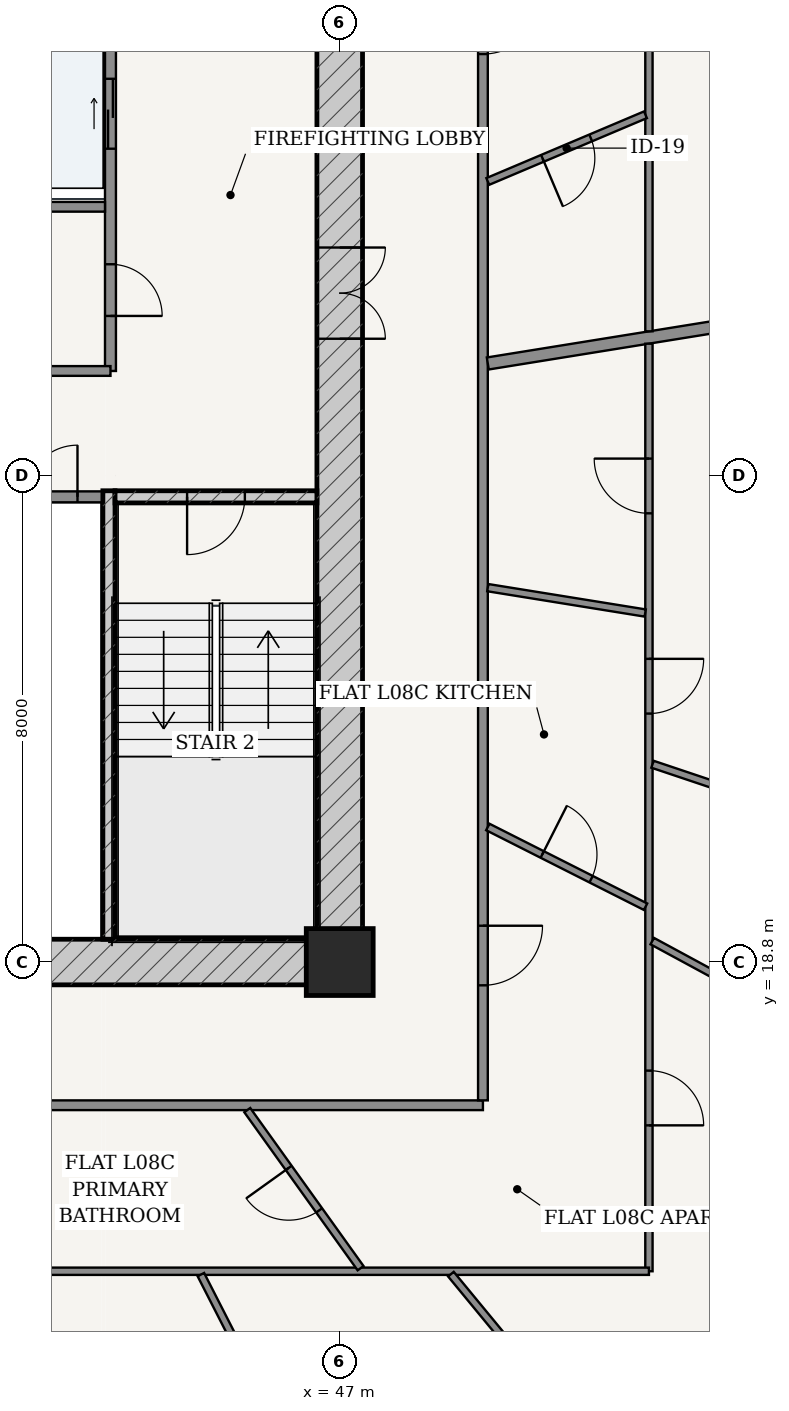
"""IFC4 building model, lengths in metres.
Left out: names, types, materials, properties, quantities, classifications, styles, units other than length and angle.
Written with IfcOpenShell. Run it as: python <this file> out.ifc"""

import sys

from ifc_helpers import new_model, si_unit, direction, frame, frame_2d, origin, origin_2d, place, context, subcontext, project, spatial, rectangle, extrude, source, transform, mapped, element, fill, save


model = new_model("IFC4")
c1 = context("Model", 3, precision=1e-05, world=origin(), true_north=direction((-0.2419218956, 0.970295726276)))
c2 = subcontext(c1, "Body", "Model", "MODEL_VIEW")
j1 = project(units=[si_unit("LENGTHUNIT", "METRE"), si_unit("PLANEANGLEUNIT", "RADIAN")], contexts=[c1])
p1 = place(None, origin())
s1 = spatial("IfcSite", under=j1, at=p1, CompositionType="ELEMENT")
p2 = place(p1, origin())
s2 = spatial("IfcBuilding", under=s1, at=p2, CompositionType="ELEMENT")
p3 = place(p2, frame((0.0, 0.0, 34.8)))
s3 = spatial("IfcBuildingStorey", under=s2, at=p3, CompositionType="ELEMENT", Elevation=34.8)
p4 = place(p3, frame((47.0, 18.8, 0.0), z_axis=(0.0, 0.0, 1.0), x_axis=(1.0, 0.0, 0.0)))
e1 = element("IfcColumn", 1, at=p4, inside=s3, PredefinedType="COLUMN", context=c2, shape_type="SweptSolid", body=[
    extrude(rectangle(XDim=1.1, YDim=1.1, at=origin_2d()), origin(), (0.0, 0.0, 1.0), 3.6),
])
p5 = place(p3, frame((28.625, 18.8, 0.0), z_axis=(0.0, 0.0, 1.0), x_axis=(1.0, 0.0, 0.0)))
e2 = element("IfcWall", 2, at=p5, inside=s3, PredefinedType="SHEAR", context=c2, shape_type="SweptSolid", body=[
    extrude(rectangle(XDim=18.75, YDim=0.75, at=frame_2d((9.375, 0.0))), origin(), (0.0, 0.0, 1.0), 3.32),
])
p6 = place(p5, frame((6.927, 0.0, 0.0)))
e3 = element("IfcOpeningElement", 3, at=p6, cuts=e2, PredefinedType="OPENING", context=c2, shape_type="SweptSolid", body=[
    extrude(rectangle(XDim=0.85, YDim=2.1, at=frame_2d((0.425, 1.05))), frame((0.0, 0.385, 0.0), z_axis=(0.0, -1.0, 0.0), x_axis=(1.0, 0.0, 0.0)), (0.0, 0.0, 1.0), 0.77),
])
p7 = place(p5, frame((8.95, 0.0, 0.0)))
e4 = element("IfcOpeningElement", 4, at=p7, cuts=e2, PredefinedType="OPENING", context=c2, shape_type="SweptSolid", body=[
    extrude(rectangle(XDim=0.85, YDim=2.1, at=frame_2d((0.425, 1.05))), frame((0.0, 0.385, 0.0), z_axis=(0.0, -1.0, 0.0), x_axis=(1.0, 0.0, 0.0)), (0.0, 0.0, 1.0), 0.77),
])
p8 = place(p5, frame((10.972, 0.0, 0.0)))
e5 = element("IfcOpeningElement", 5, at=p8, cuts=e2, PredefinedType="OPENING", context=c2, shape_type="SweptSolid", body=[
    extrude(rectangle(XDim=0.85, YDim=2.1, at=frame_2d((0.425, 1.05))), frame((0.0, 0.385, 0.0), z_axis=(0.0, -1.0, 0.0), x_axis=(1.0, 0.0, 0.0)), (0.0, 0.0, 1.0), 0.77),
])
p9 = place(p3, frame((47.0, 19.175, 0.0), z_axis=(0.0, 0.0, 1.0), x_axis=(0.0, 1.0, 0.0)))
e6 = element("IfcWall", 6, at=p9, inside=s3, PredefinedType="SHEAR", context=c2, shape_type="SweptSolid", body=[
    extrude(rectangle(XDim=15.25, YDim=0.75, at=frame_2d((7.625, 0.0))), origin(), (0.0, 0.0, 1.0), 3.32),
])
p10 = place(p9, frame((9.875, 0.0, 0.0)))
e7 = element("IfcOpeningElement", 7, at=p10, cuts=e6, PredefinedType="OPENING", context=c2, shape_type="SweptSolid", body=[
    extrude(rectangle(XDim=1.5, YDim=2.2, at=frame_2d((0.75, 1.1))), frame((0.0, 0.385, 0.0), z_axis=(0.0, -1.0, 0.0), x_axis=(1.0, 0.0, 0.0)), (0.0, 0.0, 1.0), 0.77),
])
p11 = place(p3, frame((43.205, 19.175, 0.0), z_axis=(0.0, 0.0, 1.0), x_axis=(0.0, 1.0, 0.0)))
e8 = element("IfcWall", 8, at=p11, inside=s3, PredefinedType="SOLIDWALL", context=c2, shape_type="SweptSolid", body=[
    extrude(rectangle(XDim=7.375, YDim=0.2, at=frame_2d((3.688, 0.0))), origin(), (0.0, 0.0, 1.0), 3.32),
])
p12 = place(p3, frame((43.305, 26.45, 0.0), z_axis=(0.0, 0.0, 1.0), x_axis=(1.0, 0.0, 0.0)))
e9 = element("IfcWall", 9, at=p12, inside=s3, PredefinedType="SOLIDWALL", context=c2, shape_type="SweptSolid", body=[
    extrude(rectangle(XDim=3.32, YDim=0.2, at=frame_2d((1.66, 0.0))), origin(), (0.0, 0.0, 1.0), 3.32),
])
p13 = place(p12, frame((1.185, 0.0, 0.0)))
e10 = element("IfcOpeningElement", 10, at=p13, cuts=e9, PredefinedType="OPENING", context=c2, shape_type="SweptSolid", body=[
    extrude(rectangle(XDim=0.95, YDim=2.15, at=frame_2d((0.475, 1.075))), frame((0.0, 0.11, 0.0), z_axis=(0.0, -1.0, 0.0), x_axis=(1.0, 0.0, 0.0)), (0.0, 0.0, 1.0), 0.22),
])
p14 = place(p3, frame((41.425, 26.45, 0.0), z_axis=(0.0, 0.0, 1.0), x_axis=(1.0, 0.0, 0.0)))
e11 = element("IfcWall", 11, at=p14, inside=s3, PredefinedType="PARTITIONING", context=c2, shape_type="SweptSolid", body=[
    extrude(rectangle(XDim=1.675, YDim=0.18, at=frame_2d((0.837, 0.0))), origin(), (0.0, 0.0, 1.0), 3.32),
])
p15 = place(p14, frame((0.413, 0.0, 0.0)))
e12 = element("IfcOpeningElement", 12, at=p15, cuts=e11, PredefinedType="OPENING", context=c2, shape_type="SweptSolid", body=[
    extrude(rectangle(XDim=0.85, YDim=2.1, at=frame_2d((0.425, 1.05))), frame((0.0, 0.1, 0.0), z_axis=(0.0, -1.0, 0.0), x_axis=(1.0, 0.0, 0.0)), (0.0, 0.0, 1.0), 0.2),
])
p16 = place(p3, frame((43.23, 28.52, 0.0), z_axis=(0.0, 0.0, 1.0), x_axis=(0.0, 1.0, 0.0)))
e13 = element("IfcWall", 13, at=p16, inside=s3, PredefinedType="PARTITIONING", context=c2, shape_type="SweptSolid", body=[
    extrude(rectangle(XDim=5.905, YDim=0.18, at=frame_2d((2.953, 0.0))), origin(), (0.0, 0.0, 1.0), 3.32),
])
p17 = place(p16, frame((0.905, 0.0, 0.0)))
e14 = element("IfcOpeningElement", 14, at=p17, cuts=e13, PredefinedType="OPENING", context=c2, shape_type="SweptSolid", body=[
    extrude(rectangle(XDim=0.85, YDim=2.1, at=frame_2d((0.425, 1.05))), frame((0.0, 0.1, 0.0), z_axis=(0.0, -1.0, 0.0), x_axis=(1.0, 0.0, 0.0)), (0.0, 0.0, 1.0), 0.2),
])
p18 = place(p16, frame((3.655, 0.0, 0.0)))
e15 = element("IfcOpeningElement", 15, at=p18, cuts=e13, PredefinedType="OPENING", context=c2, shape_type="SweptSolid", body=[
    extrude(rectangle(XDim=1.15, YDim=2.2, at=frame_2d((0.575, 1.1))), frame((0.0, 0.1, 0.0), z_axis=(0.0, -1.0, 0.0), x_axis=(1.0, 0.0, 0.0)), (0.0, 0.0, 1.0), 0.2),
])
p19 = place(p3, frame((41.425, 31.22, 0.0), z_axis=(0.0, 0.0, 1.0), x_axis=(1.0, 0.0, 0.0)))
e16 = element("IfcWall", 16, at=p19, inside=s3, PredefinedType="PARTITIONING", context=c2, shape_type="SweptSolid", body=[
    extrude(rectangle(XDim=1.715, YDim=0.16, at=frame_2d((0.857, 0.0))), origin(), (0.0, 0.0, 1.0), 3.32),
])
p20 = place(p3, frame((41.425, 28.52, 0.0), z_axis=(0.0, 0.0, 1.0), x_axis=(1.0, 0.0, 0.0)))
e17 = element("IfcWall", 17, at=p20, inside=s3, PredefinedType="PARTITIONING", context=c2, shape_type="SweptSolid", body=[
    extrude(rectangle(XDim=1.805, YDim=0.16, at=frame_2d((0.902, 0.0))), origin(), (0.0, 0.0, 1.0), 3.32),
])
p21 = place(p3, frame((26.645, 16.445, 0.0), z_axis=(0.0, 0.0, 1.0), x_axis=(1.0, 0.0, 0.0)))
e18 = element("IfcWall", 18, at=p21, inside=s3, PredefinedType="PARTITIONING", context=c2, shape_type="SweptSolid", body=[
    extrude(rectangle(XDim=22.71, YDim=0.16, at=frame_2d((11.355, 0.0))), origin(), (0.0, 0.0, 1.0), 2.688),
])
p22 = place(p3, frame((49.355, 16.525, 0.0), z_axis=(0.0, 0.0, 1.0), x_axis=(0.0, 1.0, 0.0)))
e19 = element("IfcWall", 19, at=p22, inside=s3, PredefinedType="PARTITIONING", context=c2, shape_type="SweptSolid", body=[
    extrude(rectangle(XDim=20.55, YDim=0.16, at=frame_2d((10.275, 0.0))), origin(), (0.0, 0.0, 1.0), 2.688),
])
p23 = place(p22, frame((17.207, 0.0, 0.0)))
e20 = element("IfcOpeningElement", 20, at=p23, cuts=e19, PredefinedType="OPENING", context=c2, shape_type="SweptSolid", body=[
    extrude(rectangle(XDim=0.98, YDim=2.2, at=frame_2d((0.49, 1.1))), frame((0.0, 0.09, 0.0), z_axis=(0.0, -1.0, 0.0), x_axis=(1.0, 0.0, 0.0)), (0.0, 0.0, 1.0), 0.18),
])
p24 = place(p22, frame((1.892, 0.0, 0.0)))
e21 = element("IfcOpeningElement", 21, at=p24, cuts=e19, PredefinedType="OPENING", context=c2, shape_type="SweptSolid", body=[
    extrude(rectangle(XDim=0.98, YDim=2.2, at=frame_2d((0.49, 1.1))), frame((0.0, 0.09, 0.0), z_axis=(0.0, -1.0, 0.0), x_axis=(1.0, 0.0, 0.0)), (0.0, 0.0, 1.0), 0.18),
])
p25 = place(p3, frame((49.435, 28.643, 0.0), z_axis=(0.0, 0.0, 1.0), x_axis=(0.987255953651, 0.159140447344, 0.0)))
e22 = element("IfcWall", 22, at=p25, inside=s3, PredefinedType="PARTITIONING", context=c2, shape_type="SweptSolid", body=[
    extrude(rectangle(XDim=17.105, YDim=0.2, at=frame_2d((8.553, 0.0))), origin(), (0.0, 0.0, 1.0), 2.688),
])
p26 = place(p3, frame((52.085, 39.885, 0.0), z_axis=(0.0, 0.0, 1.0), x_axis=(0.0, -1.0, 0.0)))
e23 = element("IfcWall", 23, at=p26, inside=s3, PredefinedType="PARTITIONING", context=c2, shape_type="SweptSolid", body=[
    extrude(rectangle(XDim=10.713, YDim=0.12, at=frame_2d((5.356, 0.0))), origin(), (0.0, 0.0, 1.0), 2.688),
])
p27 = place(p26, frame((3.965, 0.0, 0.0)))
e24 = element("IfcOpeningElement", 24, at=p27, cuts=e23, PredefinedType="OPENING", context=c2, shape_type="SweptSolid", body=[
    extrude(rectangle(XDim=0.9, YDim=2.15, at=frame_2d((0.45, 1.075))), frame((0.0, 0.07, 0.0), z_axis=(0.0, -1.0, 0.0), x_axis=(1.0, 0.0, 0.0)), (0.0, 0.0, 1.0), 0.14),
])
p28 = place(p3, frame((49.435, 31.636, 0.0), z_axis=(0.0, 0.0, 1.0), x_axis=(0.920969644836, 0.389634332792, 0.0)))
e25 = element("IfcWall", 25, at=p28, inside=s3, PredefinedType="PARTITIONING", context=c2, shape_type="SweptSolid", body=[
    extrude(rectangle(XDim=2.815, YDim=0.12, at=frame_2d((1.408, 0.0))), origin(), (0.0, 0.0, 1.0), 3.32),
])
p29 = place(p28, frame((0.978, 0.0, 0.0)))
e26 = element("IfcOpeningElement", 26, at=p29, cuts=e25, PredefinedType="OPENING", context=c2, shape_type="SweptSolid", body=[
    extrude(rectangle(XDim=0.86, YDim=2.15, at=frame_2d((0.43, 1.075))), frame((0.0, 0.07, 0.0), z_axis=(0.0, -1.0, 0.0), x_axis=(1.0, 0.0, 0.0)), (0.0, 0.0, 1.0), 0.14),
])
p30 = place(p3, frame((52.085, 28.968, 0.0), z_axis=(0.0, 0.0, 1.0), x_axis=(0.0, -1.0, 0.0)))
e27 = element("IfcWall", 27, at=p30, inside=s3, PredefinedType="PARTITIONING", context=c2, shape_type="SweptSolid", body=[
    extrude(rectangle(XDim=15.253, YDim=0.12, at=frame_2d((7.626, 0.0))), origin(), (0.0, 0.0, 1.0), 2.688),
])
p31 = place(p30, frame((11.954, 0.0, 0.0)))
e28 = element("IfcOpeningElement", 28, at=p31, cuts=e27, PredefinedType="OPENING", context=c2, shape_type="SweptSolid", body=[
    extrude(rectangle(XDim=0.9, YDim=2.15, at=frame_2d((0.45, 1.075))), frame((0.0, 0.07, 0.0), z_axis=(0.0, -1.0, 0.0), x_axis=(1.0, 0.0, 0.0)), (0.0, 0.0, 1.0), 0.14),
])
p32 = place(p30, frame((5.182, 0.0, 0.0)))
e29 = element("IfcOpeningElement", 29, at=p32, cuts=e27, PredefinedType="OPENING", context=c2, shape_type="SweptSolid", body=[
    extrude(rectangle(XDim=0.9, YDim=2.15, at=frame_2d((0.45, 1.075))), frame((0.0, 0.07, 0.0), z_axis=(0.0, -1.0, 0.0), x_axis=(1.0, 0.0, 0.0)), (0.0, 0.0, 1.0), 0.14),
])
p33 = place(p30, frame((1.889, 0.0, 0.0)))
e30 = element("IfcOpeningElement", 30, at=p33, cuts=e27, PredefinedType="OPENING", context=c2, shape_type="SweptSolid", body=[
    extrude(rectangle(XDim=0.9, YDim=2.15, at=frame_2d((0.45, 1.075))), frame((0.0, 0.07, 0.0), z_axis=(0.0, -1.0, 0.0), x_axis=(1.0, 0.0, 0.0)), (0.0, 0.0, 1.0), 0.14),
])
p34 = place(p3, frame((52.085, 13.715, 0.0), z_axis=(0.0, 0.0, 1.0), x_axis=(-1.0, 0.0, 0.0)))
e31 = element("IfcWall", 31, at=p34, inside=s3, PredefinedType="PARTITIONING", context=c2, shape_type="SweptSolid", body=[
    extrude(rectangle(XDim=24.772, YDim=0.12, at=frame_2d((12.386, 0.0))), origin(), (0.0, 0.0, 1.0), 2.688),
])
p35 = place(p34, frame((20.912, 0.0, 0.0)))
e32 = element("IfcOpeningElement", 32, at=p35, cuts=e31, PredefinedType="OPENING", context=c2, shape_type="SweptSolid", body=[
    extrude(rectangle(XDim=0.86, YDim=2.15, at=frame_2d((0.43, 1.075))), frame((0.0, 0.07, 0.0), z_axis=(0.0, -1.0, 0.0), x_axis=(1.0, 0.0, 0.0)), (0.0, 0.0, 1.0), 0.14),
])
p36 = place(p34, frame((13.87, 0.0, 0.0)))
e33 = element("IfcOpeningElement", 33, at=p36, cuts=e31, PredefinedType="OPENING", context=c2, shape_type="SweptSolid", body=[
    extrude(rectangle(XDim=0.9, YDim=2.15, at=frame_2d((0.45, 1.075))), frame((0.0, 0.07, 0.0), z_axis=(0.0, -1.0, 0.0), x_axis=(1.0, 0.0, 0.0)), (0.0, 0.0, 1.0), 0.14),
])
p37 = place(p3, frame((44.717, 13.66, 0.0), z_axis=(0.0, 0.0, 1.0), x_axis=(0.455131303234, -0.890424335256, 0.0)))
e34 = element("IfcWall", 34, at=p37, inside=s3, PredefinedType="PARTITIONING", context=c2, shape_type="SweptSolid", body=[
    extrude(rectangle(XDim=9.562, YDim=0.12, at=frame_2d((4.781, 0.0))), origin(), (0.0, 0.0, 1.0), 2.762),
])
p38 = place(p37, frame((4.331, 0.0, 0.0)))
e35 = element("IfcOpeningElement", 35, at=p38, cuts=e34, PredefinedType="OPENING", context=c2, shape_type="SweptSolid", body=[
    extrude(rectangle(XDim=0.9, YDim=2.15, at=frame_2d((0.45, 1.075))), frame((0.0, 0.07, 0.0), z_axis=(0.0, -1.0, 0.0), x_axis=(1.0, 0.0, 0.0)), (0.0, 0.0, 1.0), 0.14),
])
p39 = place(p3, frame((48.829, 13.667, 0.0), z_axis=(0.0, 0.0, 1.0), x_axis=(0.636177533893, -0.771542704826, 0.0)))
e36 = element("IfcWall", 36, at=p39, inside=s3, PredefinedType="PARTITIONING", context=c2, shape_type="SweptSolid", body=[
    extrude(rectangle(XDim=8.187, YDim=0.12, at=frame_2d((4.093, 0.0))), origin(), (0.0, 0.0, 1.0), 2.688),
])
p40 = place(p39, frame((2.584, 0.0, 0.0)))
e37 = element("IfcOpeningElement", 37, at=p40, cuts=e36, PredefinedType="OPENING", context=c2, shape_type="SweptSolid", body=[
    extrude(rectangle(XDim=0.9, YDim=2.15, at=frame_2d((0.45, 1.075))), frame((0.0, 0.07, 0.0), z_axis=(0.0, -1.0, 0.0), x_axis=(1.0, 0.0, 0.0)), (0.0, 0.0, 1.0), 0.14),
])
p41 = place(p3, frame((52.139, 19.144, 0.0), z_axis=(0.0, 0.0, 1.0), x_axis=(0.879372452045, -0.476134529922, 0.0)))
e38 = element("IfcWall", 38, at=p41, inside=s3, PredefinedType="PARTITIONING", context=c2, shape_type="SweptSolid", body=[
    extrude(rectangle(XDim=11.219, YDim=0.12, at=frame_2d((5.61, 0.0))), origin(), (0.0, 0.0, 1.0), 2.688),
])
p42 = place(p3, frame((52.144, 22.052, 0.0), z_axis=(0.0, 0.0, 1.0), x_axis=(0.948023034133, -0.318201707653, 0.0)))
e39 = element("IfcWall", 39, at=p42, inside=s3, PredefinedType="PARTITIONING", context=c2, shape_type="SweptSolid", body=[
    extrude(rectangle(XDim=13.279, YDim=0.12, at=frame_2d((6.639, 0.0))), origin(), (0.0, 0.0, 1.0), 2.762),
])
p43 = place(p42, frame((6.189, 0.0, 0.0)))
e40 = element("IfcOpeningElement", 40, at=p43, cuts=e39, PredefinedType="OPENING", context=c2, shape_type="SweptSolid", body=[
    extrude(rectangle(XDim=0.9, YDim=2.15, at=frame_2d((0.45, 1.075))), frame((0.0, 0.07, 0.0), z_axis=(0.0, -1.0, 0.0), x_axis=(1.0, 0.0, 0.0)), (0.0, 0.0, 1.0), 0.14),
])
p44 = place(p3, frame((45.48, 16.365, 0.0), z_axis=(0.0, 0.0, 1.0), x_axis=(0.582566008831, -0.812783393872, 0.0)))
e41 = element("IfcWall", 41, at=p44, inside=s3, PredefinedType="PARTITIONING", context=c2, shape_type="SweptSolid", body=[
    extrude(rectangle(XDim=3.198, YDim=0.12, at=frame_2d((1.599, 0.0))), origin(), (0.0, 0.0, 1.0), 3.32),
])
p45 = place(p44, frame((1.169, 0.0, 0.0)))
e42 = element("IfcOpeningElement", 42, at=p45, cuts=e41, PredefinedType="OPENING", context=c2, shape_type="SweptSolid", body=[
    extrude(rectangle(XDim=0.86, YDim=2.15, at=frame_2d((0.43, 1.075))), frame((0.0, 0.07, 0.0), z_axis=(0.0, -1.0, 0.0), x_axis=(1.0, 0.0, 0.0)), (0.0, 0.0, 1.0), 0.14),
])
p46 = place(p3, frame((49.435, 21.021, 0.0), z_axis=(0.0, 0.0, 1.0), x_axis=(0.892504324967, -0.451038834155, 0.0)))
e43 = element("IfcWall", 43, at=p46, inside=s3, PredefinedType="PARTITIONING", context=c2, shape_type="SweptSolid", body=[
    extrude(rectangle(XDim=2.907, YDim=0.12, at=frame_2d((1.454, 0.0))), origin(), (0.0, 0.0, 1.0), 3.32),
])
p47 = place(p46, frame((1.004, 0.0, 0.0)))
e44 = element("IfcOpeningElement", 44, at=p47, cuts=e43, PredefinedType="OPENING", context=c2, shape_type="SweptSolid", body=[
    extrude(rectangle(XDim=0.9, YDim=2.15, at=frame_2d((0.45, 1.075))), frame((0.0, 0.07, 0.0), z_axis=(0.0, -1.0, 0.0), x_axis=(1.0, 0.0, 0.0)), (0.0, 0.0, 1.0), 0.14),
])
p48 = place(p3, frame((49.435, 24.957, 0.0), z_axis=(0.0, 0.0, 1.0), x_axis=(0.987258113076, -0.159127050386, 0.0)))
e45 = element("IfcWall", 45, at=p48, inside=s3, PredefinedType="PARTITIONING", context=c2, shape_type="SweptSolid", body=[
    extrude(rectangle(XDim=2.622, YDim=0.12, at=frame_2d((1.311, 0.0))), origin(), (0.0, 0.0, 1.0), 2.688),
])
m1 = source(origin(), c2, "Body", "SweptSolid", [
    extrude(rectangle(XDim=1.5, YDim=2.2, at=frame_2d((0.75, 1.1))), frame((0.0, 0.025, 0.0), z_axis=(0.0, -1.0, 0.0), x_axis=(1.0, 0.0, 0.0)), (0.0, 0.0, 1.0), 0.05),
])
p49 = place(p10, frame((1.5, 0.0, 0.0), z_axis=(0.0, 0.0, 1.0), x_axis=(-1.0, 0.0, 0.0)))
e46 = element("IfcDoor", 46, at=p49, inside=s3, OperationType="DOUBLE_DOOR_SINGLE_SWING", PredefinedType="DOOR", context=c2, shape_type="MappedRepresentation", body=[
    mapped(m1, transform((0.0, 0.0, 0.0), scale=1.0)),
])
fill(e7, e46)
m2 = source(origin(), c2, "Body", "SweptSolid", [
    extrude(rectangle(XDim=0.95, YDim=2.15, at=frame_2d((0.475, 1.075))), frame((0.0, 0.025, 0.0), z_axis=(0.0, -1.0, 0.0), x_axis=(1.0, 0.0, 0.0)), (0.0, 0.0, 1.0), 0.05),
])
p50 = place(p13, frame((0.95, 0.0, 0.0), z_axis=(0.0, 0.0, 1.0), x_axis=(-1.0, 0.0, 0.0)))
e47 = element("IfcDoor", 47, at=p50, inside=s3, OperationType="SINGLE_SWING_RIGHT", PredefinedType="DOOR", context=c2, shape_type="MappedRepresentation", body=[
    mapped(m2, transform((0.0, 0.0, 0.0), scale=1.0)),
])
fill(e10, e47)
m3 = source(origin(), c2, "Body", "SweptSolid", [
    extrude(rectangle(XDim=0.85, YDim=2.1, at=frame_2d((0.425, 1.05))), frame((0.0, 0.025, 0.0), z_axis=(0.0, -1.0, 0.0), x_axis=(1.0, 0.0, 0.0)), (0.0, 0.0, 1.0), 0.05),
])
p51 = place(p15, origin())
e48 = element("IfcDoor", 48, at=p51, inside=s3, OperationType="SINGLE_SWING_RIGHT", PredefinedType="DOOR", context=c2, shape_type="MappedRepresentation", body=[
    mapped(m3, transform((0.0, 0.0, 0.0), scale=1.0)),
])
fill(e12, e48)
p52 = place(p17, frame((0.85, 0.0, 0.0), z_axis=(0.0, 0.0, 1.0), x_axis=(-1.0, 0.0, 0.0)))
e49 = element("IfcDoor", 49, at=p52, inside=s3, OperationType="SINGLE_SWING_RIGHT", PredefinedType="DOOR", context=c2, shape_type="MappedRepresentation", body=[
    mapped(m3, transform((0.0, 0.0, 0.0), scale=1.0)),
])
fill(e14, e49)
m4 = source(origin(), c2, "Body", "SweptSolid", [
    extrude(rectangle(XDim=1.15, YDim=2.2, at=frame_2d((0.575, 1.1))), frame((0.0, 0.025, 0.0), z_axis=(0.0, -1.0, 0.0), x_axis=(1.0, 0.0, 0.0)), (0.0, 0.0, 1.0), 0.05),
])
p53 = place(p18, origin())
e50 = element("IfcDoor", 50, at=p53, inside=s3, OperationType="DOUBLE_DOOR_SLIDING", PredefinedType="DOOR", context=c2, shape_type="MappedRepresentation", body=[
    mapped(m4, transform((0.0, 0.0, 0.0), scale=1.0)),
])
fill(e15, e50)
m5 = source(origin(), c2, "Body", "SweptSolid", [
    extrude(rectangle(XDim=0.98, YDim=2.2, at=frame_2d((0.49, 1.1))), frame((0.0, 0.025, 0.0), z_axis=(0.0, -1.0, 0.0), x_axis=(1.0, 0.0, 0.0)), (0.0, 0.0, 1.0), 0.05),
])
p54 = place(p23, frame((0.98, 0.0, 0.0), z_axis=(0.0, 0.0, 1.0), x_axis=(-1.0, 0.0, 0.0)))
e51 = element("IfcDoor", 51, at=p54, inside=s3, OperationType="SINGLE_SWING_LEFT", PredefinedType="DOOR", context=c2, shape_type="MappedRepresentation", body=[
    mapped(m5, transform((0.0, 0.0, 0.0), scale=1.0)),
])
fill(e20, e51)
m6 = source(origin(), c2, "Body", "SweptSolid", [
    extrude(rectangle(XDim=0.86, YDim=2.15, at=frame_2d((0.43, 1.075))), frame((0.0, 0.025, 0.0), z_axis=(0.0, -1.0, 0.0), x_axis=(1.0, 0.0, 0.0)), (0.0, 0.0, 1.0), 0.05),
])
p55 = place(p29, frame((0.86, 0.0, 0.0), z_axis=(0.0, 0.0, 1.0), x_axis=(-1.0, 0.0, 0.0)))
e52 = element("IfcDoor", 52, at=p55, inside=s3, OperationType="SINGLE_SWING_RIGHT", PredefinedType="DOOR", context=c2, shape_type="MappedRepresentation", body=[
    mapped(m6, transform((0.0, 0.0, 0.0), scale=1.0)),
])
fill(e26, e52)
p56 = place(p24, frame((0.98, 0.0, 0.0), z_axis=(0.0, 0.0, 1.0), x_axis=(-1.0, 0.0, 0.0)))
e53 = element("IfcDoor", 53, at=p56, inside=s3, OperationType="SINGLE_SWING_LEFT", PredefinedType="DOOR", context=c2, shape_type="MappedRepresentation", body=[
    mapped(m5, transform((0.0, 0.0, 0.0), scale=1.0)),
])
fill(e21, e53)
p57 = place(p45, frame((0.86, 0.0, 0.0), z_axis=(0.0, 0.0, 1.0), x_axis=(-1.0, 0.0, 0.0)))
e54 = element("IfcDoor", 54, at=p57, inside=s3, OperationType="SINGLE_SWING_RIGHT", PredefinedType="DOOR", context=c2, shape_type="MappedRepresentation", body=[
    mapped(m6, transform((0.0, 0.0, 0.0), scale=1.0)),
])
fill(e42, e54)
m7 = source(origin(), c2, "Body", "SweptSolid", [
    extrude(rectangle(XDim=0.9, YDim=2.15, at=frame_2d((0.45, 1.075))), frame((0.0, 0.025, 0.0), z_axis=(0.0, -1.0, 0.0), x_axis=(1.0, 0.0, 0.0)), (0.0, 0.0, 1.0), 0.05),
])
p58 = place(p47, origin())
e55 = element("IfcDoor", 55, at=p58, inside=s3, OperationType="SINGLE_SWING_LEFT", PredefinedType="DOOR", context=c2, shape_type="MappedRepresentation", body=[
    mapped(m7, transform((0.0, 0.0, 0.0), scale=1.0)),
])
fill(e44, e55)
p59 = place(p31, origin())
e56 = element("IfcDoor", 56, at=p59, inside=s3, OperationType="SINGLE_SWING_RIGHT", PredefinedType="DOOR", context=c2, shape_type="MappedRepresentation", body=[
    mapped(m7, transform((0.0, 0.0, 0.0), scale=1.0)),
])
fill(e28, e56)
p60 = place(p32, origin())
e57 = element("IfcDoor", 57, at=p60, inside=s3, OperationType="SINGLE_SWING_LEFT", PredefinedType="DOOR", context=c2, shape_type="MappedRepresentation", body=[
    mapped(m7, transform((0.0, 0.0, 0.0), scale=1.0)),
])
fill(e29, e57)
p61 = place(p33, frame((0.9, 0.0, 0.0), z_axis=(0.0, 0.0, 1.0), x_axis=(-1.0, 0.0, 0.0)))
e58 = element("IfcDoor", 58, at=p61, inside=s3, OperationType="SINGLE_SWING_RIGHT", PredefinedType="DOOR", context=c2, shape_type="MappedRepresentation", body=[
    mapped(m7, transform((0.0, 0.0, 0.0), scale=1.0)),
])
fill(e30, e58)
save(model, sys.argv[1])
